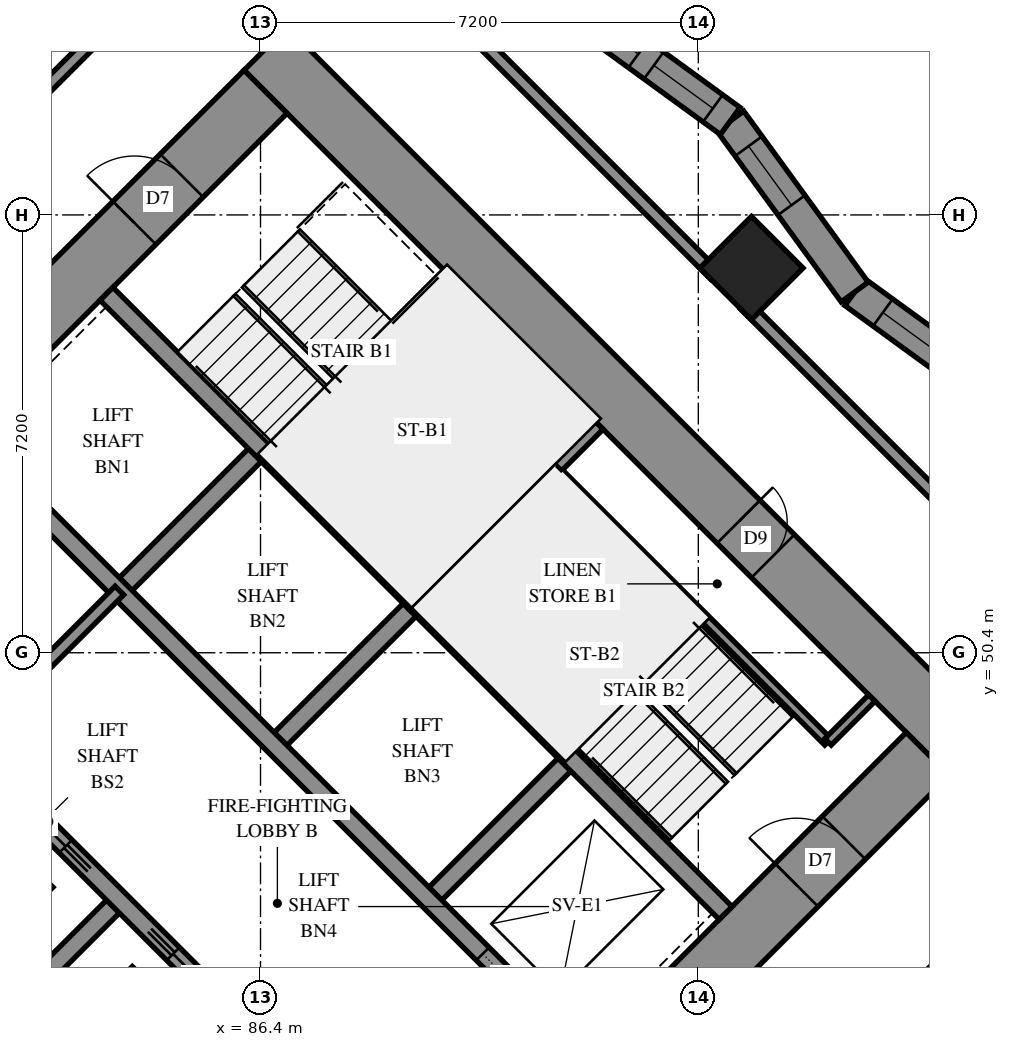
"""IFC4 building model, lengths in metres.
Left out: names, types, materials, properties, quantities, classifications, styles, units other than length and angle.
Written with IfcOpenShell. Run it as: python <this file> out.ifc"""

import sys

from ifc_helpers import new_model, si_unit, direction, frame, frame_2d, origin, origin_2d, place, context, subcontext, project, spatial, polyline, rectangle, outline, extrude, element, fill, save


model = new_model("IFC4")
c1 = context("Model", 3, precision=1e-05, world=origin(), true_north=direction((0.0, 1.0)))
c2 = subcontext(c1, "Body", "Model", "MODEL_VIEW")
j1 = project(units=[si_unit("LENGTHUNIT", "METRE"), si_unit("PLANEANGLEUNIT", "RADIAN")], contexts=[c1])
p1 = place(None, origin())
s1 = spatial("IfcSite", under=j1, at=p1, CompositionType="ELEMENT")
p2 = place(p1, origin())
s2 = spatial("IfcBuilding", under=s1, at=p2, CompositionType="ELEMENT")
p3 = place(p2, frame((0.0, 0.0, 54.2)))
s3 = spatial("IfcBuildingStorey", under=s2, at=p3, CompositionType="ELEMENT", Elevation=54.2)
p4 = place(p3, frame((94.474, 56.727, 0.0), z_axis=(0.0, 0.0, 1.0), x_axis=(0.7071067812, -0.7071067812, 0.0)))
e1 = element("IfcColumn", 1, at=p4, inside=s3, PredefinedType="COLUMN", context=c2, shape_type="SweptSolid", body=[
    extrude(rectangle(XDim=1.2, YDim=1.2, at=origin_2d()), origin(), (0.0, 0.0, 1.0), 3.1),
])
p5 = place(p3, frame((75.594, 49.443, -0.3), z_axis=(0.0, 0.0, 1.0), x_axis=(0.7071037324, -0.70710983, 0.0)))
e2 = element("IfcWall", 2, at=p5, inside=s3, PredefinedType="SHEAR", context=c2, shape_type="SweptSolid", body=[
    extrude(rectangle(XDim=16.4, YDim=1.0, at=frame_2d((8.2, 0.0))), origin(), (0.0, 0.0, 1.0), 2.7),
])
p6 = place(p3, frame((86.483, 60.333, -0.3), z_axis=(0.0, 0.0, 1.0), x_axis=(0.70710983, -0.7071037324, 0.0)))
e3 = element("IfcWall", 3, at=p6, inside=s3, PredefinedType="SHEAR", context=c2, shape_type="SweptSolid", body=[
    extrude(rectangle(XDim=16.4, YDim=1.0, at=frame_2d((8.2, 0.0))), origin(), (0.0, 0.0, 1.0), 2.7),
])
p7 = place(p6, frame((11.0, 0.0, 0.3)))
e4 = element("IfcOpeningElement", 4, at=p7, cuts=e3, PredefinedType="OPENING", context=c2, shape_type="SweptSolid", body=[
    extrude(rectangle(XDim=0.8, YDim=2.1, at=frame_2d((0.4, 1.05))), frame((0.0, 0.51, 0.0), z_axis=(0.0, -1.0, 0.0), x_axis=(1.0, 0.0, 0.0)), (0.0, 0.0, 1.0), 1.02),
])
p8 = place(p3, frame((76.301, 49.443, -0.3), z_axis=(0.0, 0.0, 1.0), x_axis=(0.7071067812, 0.7071067812, 0.0)))
e5 = element("IfcWall", 5, at=p8, inside=s3, PredefinedType="SHEAR", context=c2, shape_type="SweptSolid", body=[
    extrude(rectangle(XDim=14.4, YDim=1.0, at=frame_2d((7.2, 0.0))), origin(), (0.0, 0.0, 1.0), 2.7),
])
p9 = place(p8, frame((4.55, 0.0, 0.3)))
e6 = element("IfcOpeningElement", 6, at=p9, cuts=e5, PredefinedType="OPENING", context=c2, shape_type="SweptSolid", body=[
    extrude(rectangle(XDim=1.1, YDim=2.1, at=frame_2d((0.55, 1.05))), frame((0.0, 0.51, 0.0), z_axis=(0.0, -1.0, 0.0), x_axis=(1.0, 0.0, 0.0)), (0.0, 0.0, 1.0), 1.02),
])
p10 = place(p8, frame((11.35, 0.0, 0.3)))
e7 = element("IfcOpeningElement", 7, at=p10, cuts=e5, PredefinedType="OPENING", context=c2, shape_type="SweptSolid", body=[
    extrude(rectangle(XDim=1.1, YDim=2.1, at=frame_2d((0.55, 1.05))), frame((0.0, 0.51, 0.0), z_axis=(0.0, -1.0, 0.0), x_axis=(1.0, 0.0, 0.0)), (0.0, 0.0, 1.0), 1.02),
])
p11 = place(p3, frame((87.19, 38.554, -0.3), z_axis=(0.0, 0.0, 1.0), x_axis=(0.707103309, 0.7071102534, 0.0)))
e8 = element("IfcWall", 8, at=p11, inside=s3, PredefinedType="SHEAR", context=c2, shape_type="SweptSolid", body=[
    extrude(rectangle(XDim=14.4, YDim=1.0, at=frame_2d((7.2, 0.0))), origin(), (0.0, 0.0, 1.0), 2.7),
])
p12 = place(p11, frame((4.55, 0.0, 0.3)))
e9 = element("IfcOpeningElement", 9, at=p12, cuts=e8, PredefinedType="OPENING", context=c2, shape_type="SweptSolid", body=[
    extrude(rectangle(XDim=1.1, YDim=2.1, at=frame_2d((0.55, 1.05))), frame((0.0, 0.51, 0.0), z_axis=(0.0, -1.0, 0.0), x_axis=(1.0, 0.0, 0.0)), (0.0, 0.0, 1.0), 1.02),
])
p13 = place(p11, frame((11.35, 0.0, 0.3)))
e10 = element("IfcOpeningElement", 10, at=p13, cuts=e8, PredefinedType="OPENING", context=c2, shape_type="SweptSolid", body=[
    extrude(rectangle(XDim=1.1, YDim=2.1, at=frame_2d((0.55, 1.05))), frame((0.0, 0.51, 0.0), z_axis=(0.0, -1.0, 0.0), x_axis=(1.0, 0.0, 0.0)), (0.0, 0.0, 1.0), 1.02),
])
p14 = place(p3, frame((84.079, 51.423, 0.0), z_axis=(0.0, 0.0, 1.0), x_axis=(0.7071219326, 0.7070916295, 0.0)))
e11 = element("IfcWall", 11, at=p14, inside=s3, PredefinedType="SOLIDWALL", context=c2, shape_type="SweptSolid", body=[
    extrude(rectangle(XDim=3.3, YDim=0.3, at=frame_2d((1.65, 0.0))), origin(), (0.0, 0.0, 1.0), 3.1),
])
p15 = place(p3, frame((81.746, 43.999, 0.0), z_axis=(0.0, 0.0, 1.0), x_axis=(0.7071067812, 0.7071067812, 0.0)))
e12 = element("IfcWall", 12, at=p15, inside=s3, PredefinedType="SOLIDWALL", context=c2, shape_type="SweptSolid", body=[
    extrude(rectangle(XDim=3.3, YDim=0.3, at=frame_2d((1.65, 0.0))), origin(), (0.0, 0.0, 1.0), 3.1),
])
for number, where, z_axis, x_axis in (
    (13, (86.625, 48.878, 0.0), (0.0, 0.0, 1.0), (0.707, 0.707, 0.0)),
    (14, (89.17, 46.332, 0.0), (0.0, 0.0, 1.0), (0.707, 0.707, 0.0)),
):
    element("IfcWall", number, at=place(p3, frame(where, z_axis=z_axis, x_axis=x_axis)), inside=s3, PredefinedType="SOLIDWALL", context=c2, shape_type="SweptSolid", body=[
        extrude(rectangle(XDim=3.3, YDim=0.3, at=frame_2d((1.65, 0.0))), origin(), (0.0, 0.0, 1.0), 3.1),
    ])
p16 = place(p3, frame((78.988, 51.423, 0.0), z_axis=(0.0, 0.0, 1.0), x_axis=(0.7071067812, -0.7071067812, 0.0)))
e15 = element("IfcWall", 15, at=p16, inside=s3, PredefinedType="SOLIDWALL", context=c2, shape_type="SweptSolid", body=[
    extrude(rectangle(XDim=14.4, YDim=0.3, at=frame_2d((7.2, 0.0))), origin(), (0.0, 0.0, 1.0), 3.1),
])
p17 = place(p16, frame((1.25, 0.0, 0.0)))
e16 = element("IfcOpeningElement", 16, at=p17, cuts=e15, PredefinedType="OPENING", context=c2, shape_type="SweptSolid", body=[
    extrude(rectangle(XDim=1.1, YDim=2.1, at=frame_2d((0.55, 1.05))), frame((0.0, 0.16, 0.0), z_axis=(0.0, -1.0, 0.0), x_axis=(1.0, 0.0, 0.0)), (0.0, 0.0, 1.0), 0.32),
])
p18 = place(p16, frame((4.85, 0.0, 0.0)))
e17 = element("IfcOpeningElement", 17, at=p18, cuts=e15, PredefinedType="OPENING", context=c2, shape_type="SweptSolid", body=[
    extrude(rectangle(XDim=1.1, YDim=2.1, at=frame_2d((0.55, 1.05))), frame((0.0, 0.16, 0.0), z_axis=(0.0, -1.0, 0.0), x_axis=(1.0, 0.0, 0.0)), (0.0, 0.0, 1.0), 0.32),
])
p19 = place(p16, frame((8.45, 0.0, 0.0)))
e18 = element("IfcOpeningElement", 18, at=p19, cuts=e15, PredefinedType="OPENING", context=c2, shape_type="SweptSolid", body=[
    extrude(rectangle(XDim=1.1, YDim=2.1, at=frame_2d((0.55, 1.05))), frame((0.0, 0.16, 0.0), z_axis=(0.0, -1.0, 0.0), x_axis=(1.0, 0.0, 0.0)), (0.0, 0.0, 1.0), 0.32),
])
p20 = place(p16, frame((12.05, 0.0, 0.0)))
e19 = element("IfcOpeningElement", 19, at=p20, cuts=e15, PredefinedType="OPENING", context=c2, shape_type="SweptSolid", body=[
    extrude(rectangle(XDim=1.1, YDim=2.1, at=frame_2d((0.55, 1.05))), frame((0.0, 0.16, 0.0), z_axis=(0.0, -1.0, 0.0), x_axis=(1.0, 0.0, 0.0)), (0.0, 0.0, 1.0), 0.32),
])
p21 = place(p3, frame((81.534, 53.969, 0.0), z_axis=(0.0, 0.0, 1.0), x_axis=(0.707103309, -0.7071102534, 0.0)))
e20 = element("IfcWall", 20, at=p21, inside=s3, PredefinedType="SOLIDWALL", context=c2, shape_type="SweptSolid", body=[
    extrude(rectangle(XDim=14.4, YDim=0.3, at=frame_2d((7.2, 0.0))), origin(), (0.0, 0.0, 1.0), 3.1),
])
p22 = place(p21, frame((12.05, 0.0, 0.0)))
e21 = element("IfcOpeningElement", 21, at=p22, cuts=e20, PredefinedType="OPENING", context=c2, shape_type="SweptSolid", body=[
    extrude(rectangle(XDim=1.1, YDim=2.1, at=frame_2d((0.55, 1.05))), frame((0.0, 0.16, 0.0), z_axis=(0.0, -1.0, 0.0), x_axis=(1.0, 0.0, 0.0)), (0.0, 0.0, 1.0), 0.32),
])
for number, where, z_axis, x_axis in (
    (22, (83.867, 56.302, 0.0), (0.0, 0.0, 1.0), (0.707, -0.707, 0.0)),
    (23, (88.958, 51.211, 0.0), (0.0, 0.0, 1.0), (0.707, -0.707, 0.0)),
):
    element("IfcWall", number, at=place(p3, frame(where, z_axis=z_axis, x_axis=x_axis)), inside=s3, PredefinedType="SOLIDWALL", context=c2, shape_type="SweptSolid", body=[
        extrude(rectangle(XDim=7.2, YDim=0.3, at=frame_2d((3.6, 0.0))), origin(), (0.0, 0.0, 1.0), 3.1),
    ])
p23 = place(p3, frame((88.958, 51.211, 0.0), z_axis=(0.0, 0.0, 1.0), x_axis=(0.7071067812, 0.7071067812, 0.0)))
e24 = element("IfcWall", 24, at=p23, inside=s3, PredefinedType="SOLIDWALL", context=c2, shape_type="SweptSolid", body=[
    extrude(rectangle(XDim=4.2, YDim=0.3, at=frame_2d((2.1, 0.0))), origin(), (0.0, 0.0, 1.0), 3.1),
])
p24 = place(p3, frame((98.984, 54.286, 0.0), z_axis=(0.0, 0.0, 1.0), x_axis=(-0.8086577494, 0.5882793931, 0.0)))
e25 = element("IfcWall", 25, at=p24, inside=s3, PredefinedType="SOLIDWALL", context=c2, shape_type="SweptSolid", body=[
    extrude(outline(polyline([(-0.043, -0.275), (3.435, -0.275), (3.522, 0.275), (0.043, 0.275), (-0.043, -0.275)])), origin(), (0.0, 0.0, 1.0), 3.1),
])
p25 = place(p24, frame((1.705, 0.0, 0.5)))
e26 = element("IfcOpeningElement", 26, at=p25, cuts=e25, PredefinedType="OPENING", context=c2, shape_type="SweptSolid", body=[
    extrude(rectangle(XDim=1.2, YDim=2.45, at=frame_2d((0.6, 1.225))), frame((0.0, 0.285, 0.0), z_axis=(0.0, -1.0, 0.0), x_axis=(1.0, 0.0, 0.0)), (0.0, 0.0, 1.0), 0.57),
])
p26 = place(p3, frame((96.171, 56.332, 0.0), z_axis=(0.0, 0.0, 1.0), x_axis=(-0.5882793931, 0.8086577494, 0.0)))
e27 = element("IfcWall", 27, at=p26, inside=s3, PredefinedType="SOLIDWALL", context=c2, shape_type="SweptSolid", body=[
    extrude(outline(polyline([(0.043, -0.275), (3.522, -0.275), (3.435, 0.275), (-0.043, 0.275), (0.043, -0.275)])), origin(), (0.0, 0.0, 1.0), 3.1),
])
p27 = place(p26, frame((1.766, 0.0, 0.5)))
e28 = element("IfcOpeningElement", 28, at=p27, cuts=e27, PredefinedType="OPENING", context=c2, shape_type="SweptSolid", body=[
    extrude(rectangle(XDim=1.2, YDim=2.45, at=frame_2d((0.6, 1.225))), frame((0.0, 0.285, 0.0), z_axis=(0.0, -1.0, 0.0), x_axis=(1.0, 0.0, 0.0)), (0.0, 0.0, 1.0), 0.57),
])
p28 = place(p3, frame((94.125, 59.145, 0.0), z_axis=(0.0, 0.0, 1.0), x_axis=(-0.808644072, 0.5882981939, 0.0)))
e29 = element("IfcWall", 29, at=p28, inside=s3, PredefinedType="SOLIDWALL", context=c2, shape_type="SweptSolid", body=[
    extrude(outline(polyline([(-0.043, -0.275), (3.435, -0.275), (3.522, 0.275), (0.043, 0.275), (-0.043, -0.275)])), origin(), (0.0, 0.0, 1.0), 3.1),
])
p29 = place(p28, frame((0.354, 0.0, 0.5)))
e30 = element("IfcOpeningElement", 30, at=p29, cuts=e29, PredefinedType="OPENING", context=c2, shape_type="SweptSolid", body=[
    extrude(rectangle(XDim=1.2, YDim=2.45, at=frame_2d((0.6, 1.225))), frame((0.0, 0.285, 0.0), z_axis=(0.0, -1.0, 0.0), x_axis=(1.0, 0.0, 0.0)), (0.0, 0.0, 1.0), 0.57),
])
p30 = place(p28, frame((1.871, 0.0, 0.5)))
e31 = element("IfcOpeningElement", 31, at=p30, cuts=e29, PredefinedType="OPENING", context=c2, shape_type="SweptSolid", body=[
    extrude(rectangle(XDim=1.2, YDim=2.45, at=frame_2d((0.6, 1.225))), frame((0.0, 0.285, 0.0), z_axis=(0.0, -1.0, 0.0), x_axis=(1.0, 0.0, 0.0)), (0.0, 0.0, 1.0), 0.57),
])
p31 = place(p3, frame((91.313, 53.354, 0.0), z_axis=(0.0, 0.0, 1.0), x_axis=(0.7071147811, -0.7070987812, 0.0)))
e32 = element("IfcWall", 32, at=p31, inside=s3, PredefinedType="PARTITIONING", context=c2, shape_type="SweptSolid", body=[
    extrude(rectangle(XDim=6.25, YDim=0.15, at=frame_2d((3.125, 0.0))), origin(), (0.0, 0.0, 1.0), 3.1),
])
p32 = place(p3, frame((95.732, 48.934, 0.0), z_axis=(0.0, 0.0, 1.0), x_axis=(0.7071067812, 0.7071067812, 0.0)))
e33 = element("IfcWall", 33, at=p32, inside=s3, PredefinedType="PARTITIONING", context=c2, shape_type="SweptSolid", body=[
    extrude(rectangle(XDim=1.02, YDim=0.15, at=frame_2d((0.51, 0.0))), origin(), (0.0, 0.0, 1.0), 3.1),
])
p33 = place(p3, frame((81.534, 48.878, 0.0), z_axis=(0.0, 0.0, 1.0), x_axis=(0.707092892, 0.7071206701, 0.0)))
e34 = element("IfcWall", 34, at=p33, inside=s3, PredefinedType="PARTITIONING", context=c2, shape_type="SweptSolid", body=[
    extrude(rectangle(XDim=3.6, YDim=0.2, at=frame_2d((1.8, 0.0))), origin(), (0.0, 0.0, 1.0), 3.1),
])
p34 = place(p3, frame((95.109, 42.091, 0.0), z_axis=(0.0, 0.0, 1.0), x_axis=(0.7071113562, 0.7071022062, 0.0)))
e35 = element("IfcWall", 35, at=p34, inside=s3, PredefinedType="PARTITIONING", context=c2, shape_type="SweptSolid", body=[
    extrude(rectangle(XDim=10.929, YDim=0.2, at=frame_2d((5.465, 0.0))), origin(), (0.0, 0.0, 1.0), 3.1),
])
p35 = place(p3, frame((94.757, 42.445, 0.0), z_axis=(0.0, 0.0, 1.0), x_axis=(0.7071067812, 0.7071067812, 0.0)))
e36 = element("IfcWall", 36, at=p35, inside=s3, PredefinedType="PARTITIONING", context=c2, shape_type="SweptSolid", body=[
    extrude(rectangle(XDim=9.399, YDim=0.2, at=frame_2d((4.699, 0.0))), origin(), (0.0, 0.0, 1.0), 3.1),
])
p36 = place(p3, frame((81.052, 57.873, 0.0), z_axis=(0.0, 0.0, 1.0), x_axis=(0.7071067812, 0.7071067812, 0.0)))
e37 = element("IfcWall", 37, at=p36, inside=s3, PredefinedType="PARTITIONING", context=c2, shape_type="SweptSolid", body=[
    extrude(rectangle(XDim=8.18, YDim=0.2, at=frame_2d((4.09, 0.0))), origin(), (0.0, 0.0, 1.0), 3.1),
])
p37 = place(p36, frame((0.823, 0.0, 0.0)))
e38 = element("IfcOpeningElement", 38, at=p37, cuts=e37, PredefinedType="OPENING", context=c2, shape_type="SweptSolid", body=[
    extrude(rectangle(XDim=1.0, YDim=2.1, at=frame_2d((0.5, 1.05))), frame((0.0, 0.11, 0.0), z_axis=(0.0, -1.0, 0.0), x_axis=(1.0, 0.0, 0.0)), (0.0, 0.0, 1.0), 0.22),
])
p38 = place(p3, frame((89.271, 61.215, 0.0), z_axis=(0.0, 0.0, 1.0), x_axis=(0.7071067812, -0.7071067812, 0.0)))
e39 = element("IfcWall", 39, at=p38, inside=s3, PredefinedType="PARTITIONING", context=c2, shape_type="SweptSolid", body=[
    extrude(rectangle(XDim=6.505, YDim=0.2, at=frame_2d((3.253, 0.0))), origin(), (0.0, 0.0, 1.0), 3.1),
])
p39 = place(p3, frame((94.363, 56.123, 0.0), z_axis=(0.0, 0.0, 1.0), x_axis=(0.7071067812, -0.7071067812, 0.0)))
e40 = element("IfcWall", 40, at=p39, inside=s3, PredefinedType="PARTITIONING", context=c2, shape_type="SweptSolid", body=[
    extrude(rectangle(XDim=6.503, YDim=0.2, at=frame_2d((3.251, 0.0))), origin(), (0.0, 0.0, 1.0), 3.1),
])
p40 = place(p25, origin())
e41 = element("IfcWindow", 41, at=p40, inside=s3, PartitioningType="SINGLE_PANEL", PredefinedType="WINDOW", context=c2, shape_type="SweptSolid", body=[
    extrude(rectangle(XDim=1.2, YDim=2.45, at=frame_2d((0.6, 1.225))), frame((0.0, 0.155, 0.0), z_axis=(0.0, -1.0, 0.0), x_axis=(1.0, 0.0, 0.0)), (0.0, 0.0, 1.0), 0.06),
])
fill(e26, e41)
p41 = place(p27, origin())
e42 = element("IfcWindow", 42, at=p41, inside=s3, PartitioningType="SINGLE_PANEL", PredefinedType="WINDOW", context=c2, shape_type="SweptSolid", body=[
    extrude(rectangle(XDim=1.2, YDim=2.45, at=frame_2d((0.6, 1.225))), frame((0.0, 0.155, 0.0), z_axis=(0.0, -1.0, 0.0), x_axis=(1.0, 0.0, 0.0)), (0.0, 0.0, 1.0), 0.06),
])
fill(e28, e42)
p42 = place(p29, origin())
e43 = element("IfcWindow", 43, at=p42, inside=s3, PartitioningType="SINGLE_PANEL", PredefinedType="WINDOW", context=c2, shape_type="SweptSolid", body=[
    extrude(rectangle(XDim=1.2, YDim=2.45, at=frame_2d((0.6, 1.225))), frame((0.0, 0.155, 0.0), z_axis=(0.0, -1.0, 0.0), x_axis=(1.0, 0.0, 0.0)), (0.0, 0.0, 1.0), 0.06),
])
fill(e30, e43)
p43 = place(p30, origin())
e44 = element("IfcWindow", 44, at=p43, inside=s3, PartitioningType="SINGLE_PANEL", PredefinedType="WINDOW", context=c2, shape_type="SweptSolid", body=[
    extrude(rectangle(XDim=1.2, YDim=2.45, at=frame_2d((0.6, 1.225))), frame((0.0, 0.155, 0.0), z_axis=(0.0, -1.0, 0.0), x_axis=(1.0, 0.0, 0.0)), (0.0, 0.0, 1.0), 0.06),
])
fill(e31, e44)
p44 = place(p7, origin())
e45 = element("IfcDoor", 45, at=p44, inside=s3, OperationType="SINGLE_SWING_RIGHT", PredefinedType="DOOR", context=c2, shape_type="SweptSolid", body=[
    extrude(rectangle(XDim=0.8, YDim=2.1, at=frame_2d((0.4, 1.05))), frame((0.0, -0.44, 0.0), z_axis=(0.0, -1.0, 0.0), x_axis=(1.0, 0.0, 0.0)), (0.0, 0.0, 1.0), 0.05),
])
fill(e4, e45)
p45 = place(p10, origin())
e46 = element("IfcDoor", 46, at=p45, inside=s3, OperationType="SINGLE_SWING_LEFT", PredefinedType="DOOR", context=c2, shape_type="SweptSolid", body=[
    extrude(rectangle(XDim=1.1, YDim=2.1, at=frame_2d((0.55, 1.05))), frame((0.0, 0.025, 0.0), z_axis=(0.0, -1.0, 0.0), x_axis=(1.0, 0.0, 0.0)), (0.0, 0.0, 1.0), 0.05),
])
fill(e7, e46)
p46 = place(p13, origin())
e47 = element("IfcDoor", 47, at=p46, inside=s3, OperationType="SINGLE_SWING_RIGHT", PredefinedType="DOOR", context=c2, shape_type="SweptSolid", body=[
    extrude(rectangle(XDim=1.1, YDim=2.1, at=frame_2d((0.55, 1.05))), frame((0.0, 0.025, 0.0), z_axis=(0.0, -1.0, 0.0), x_axis=(1.0, 0.0, 0.0)), (0.0, 0.0, 1.0), 0.05),
])
fill(e10, e47)
p47 = place(p18, origin())
e48 = element("IfcDoor", 48, at=p47, inside=s3, OperationType="SLIDING_TO_RIGHT", PredefinedType="DOOR", context=c2, shape_type="SweptSolid", body=[
    extrude(rectangle(XDim=1.1, YDim=2.1, at=frame_2d((0.55, 1.05))), frame((0.0, 0.025, 0.0), z_axis=(0.0, -1.0, 0.0), x_axis=(1.0, 0.0, 0.0)), (0.0, 0.0, 1.0), 0.05),
])
fill(e17, e48)
p48 = place(p19, origin())
e49 = element("IfcDoor", 49, at=p48, inside=s3, OperationType="SLIDING_TO_LEFT", PredefinedType="DOOR", context=c2, shape_type="SweptSolid", body=[
    extrude(rectangle(XDim=1.1, YDim=2.1, at=frame_2d((0.55, 1.05))), frame((0.0, 0.025, 0.0), z_axis=(0.0, -1.0, 0.0), x_axis=(1.0, 0.0, 0.0)), (0.0, 0.0, 1.0), 0.05),
])
fill(e18, e49)
p49 = place(p22, origin())
e50 = element("IfcDoor", 50, at=p49, inside=s3, OperationType="SLIDING_TO_RIGHT", PredefinedType="DOOR", context=c2, shape_type="SweptSolid", body=[
    extrude(rectangle(XDim=1.1, YDim=2.1, at=frame_2d((0.55, 1.05))), frame((0.0, 0.025, 0.0), z_axis=(0.0, -1.0, 0.0), x_axis=(1.0, 0.0, 0.0)), (0.0, 0.0, 1.0), 0.05),
])
fill(e21, e50)
save(model, sys.argv[1])
